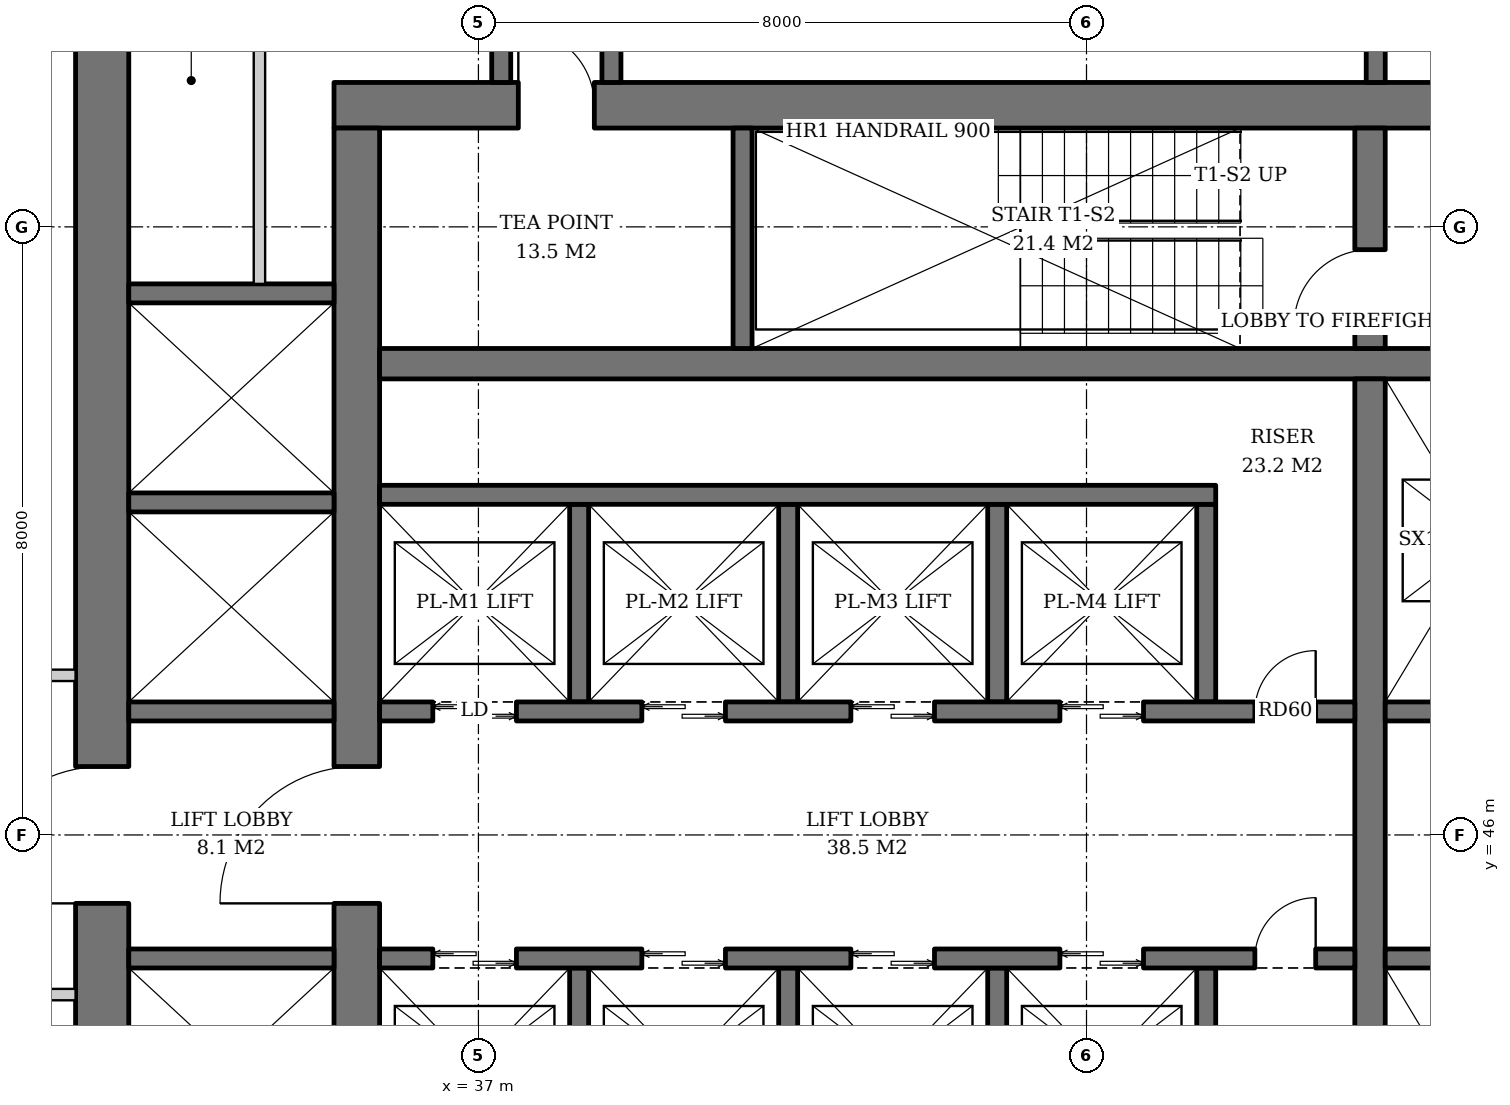
"""IFC4 building model, lengths in metres.
Left out: names, types, materials, properties, quantities, classifications, styles, units other than length and angle.
Written with IfcOpenShell. Run it as: python <this file> out.ifc"""

import sys

from ifc_helpers import new_model, si_unit, direction, frame, frame_2d, origin, place, context, subcontext, project, spatial, rectangle, extrude, element, fill, save


model = new_model("IFC4")
c1 = context("Model", 3, precision=1e-05, world=origin(), true_north=direction((0.0, 1.0)))
c2 = subcontext(c1, "Body", "Model", "MODEL_VIEW")
j1 = project(units=[si_unit("LENGTHUNIT", "METRE"), si_unit("PLANEANGLEUNIT", "RADIAN")], contexts=[c1])
p1 = place(None, origin())
s1 = spatial("IfcSite", under=j1, at=p1, CompositionType="ELEMENT")
p2 = place(p1, origin())
s2 = spatial("IfcBuilding", under=s1, at=p2, CompositionType="ELEMENT")
p3 = place(p2, frame((0.0, 0.0, 97.0)))
s3 = spatial("IfcBuildingStorey", under=s2, at=p3, CompositionType="ELEMENT", Elevation=97.0)
p4 = place(p3, frame((35.1, 55.6, 0.0), z_axis=(0.0, 0.0, 1.0), x_axis=(1.0, 0.0, 0.0)))
e1 = element("IfcWall", 1, at=p4, inside=s3, PredefinedType="SHEAR", context=c2, shape_type="SweptSolid", body=[
    extrude(rectangle(XDim=19.8, YDim=0.6, at=frame_2d((9.9, 0.0))), origin(), (0.0, 0.0, 1.0), 3.8),
])
p5 = place(p4, frame((14.54, 0.0, 0.0)))
e2 = element("IfcOpeningElement", 2, at=p5, cuts=e1, PredefinedType="OPENING", context=c2, shape_type="SweptSolid", body=[
    extrude(rectangle(XDim=1.0, YDim=2.1, at=frame_2d((0.5, 1.05))), frame((0.0, 0.31, 0.0), z_axis=(0.0, -1.0, 0.0), x_axis=(1.0, 0.0, 0.0)), (0.0, 0.0, 1.0), 0.62),
])
p6 = place(p4, frame((2.425, 0.0, 0.0)))
e3 = element("IfcOpeningElement", 3, at=p6, cuts=e1, PredefinedType="OPENING", context=c2, shape_type="SweptSolid", body=[
    extrude(rectangle(XDim=1.0, YDim=2.1, at=frame_2d((0.5, 1.05))), frame((0.0, 0.31, 0.0), z_axis=(0.0, -1.0, 0.0), x_axis=(1.0, 0.0, 0.0)), (0.0, 0.0, 1.0), 0.62),
])
p7 = place(p3, frame((35.4, 36.7, 0.0), z_axis=(0.0, 0.0, 1.0), x_axis=(0.0, 1.0, 0.0)))
e4 = element("IfcWall", 4, at=p7, inside=s3, PredefinedType="SHEAR", context=c2, shape_type="SweptSolid", body=[
    extrude(rectangle(XDim=18.6, YDim=0.6, at=frame_2d((9.3, 0.0))), origin(), (0.0, 0.0, 1.0), 3.8),
])
p8 = place(p7, frame((8.4, 0.0, 0.0)))
e5 = element("IfcOpeningElement", 5, at=p8, cuts=e4, PredefinedType="OPENING", context=c2, shape_type="SweptSolid", body=[
    extrude(rectangle(XDim=1.8, YDim=2.4, at=frame_2d((0.9, 1.2))), frame((0.0, 0.31, 0.0), z_axis=(0.0, -1.0, 0.0), x_axis=(1.0, 0.0, 0.0)), (0.0, 0.0, 1.0), 0.62),
])
p9 = place(p3, frame((32.05, 33.4, 0.0), z_axis=(0.0, 0.0, 1.0), x_axis=(0.0, 1.0, 0.0)))
e6 = element("IfcWall", 6, at=p9, inside=s3, PredefinedType="SHEAR", context=c2, shape_type="SweptSolid", body=[
    extrude(rectangle(XDim=25.2, YDim=0.7, at=frame_2d((12.6, 0.0))), origin(), (0.0, 0.0, 1.0), 3.8),
])
p10 = place(p9, frame((11.7, 0.0, 0.0)))
e7 = element("IfcOpeningElement", 7, at=p10, cuts=e6, PredefinedType="OPENING", context=c2, shape_type="SweptSolid", body=[
    extrude(rectangle(XDim=1.8, YDim=2.4, at=frame_2d((0.9, 1.2))), frame((0.0, 0.36, 0.0), z_axis=(0.0, -1.0, 0.0), x_axis=(1.0, 0.0, 0.0)), (0.0, 0.0, 1.0), 0.72),
])
p11 = place(p3, frame((35.7, 52.2, 0.0), z_axis=(0.0, 0.0, 1.0), x_axis=(1.0, 0.0, 0.0)))
e8 = element("IfcWall", 8, at=p11, inside=s3, PredefinedType="SHEAR", context=c2, shape_type="SweptSolid", body=[
    extrude(rectangle(XDim=18.6, YDim=0.4, at=frame_2d((9.3, 0.0))), origin(), (0.0, 0.0, 1.0), 3.8),
])
p12 = place(p3, frame((48.73, 40.0, 0.0), z_axis=(0.0, 0.0, 1.0), x_axis=(0.0, 1.0, 0.0)))
e9 = element("IfcWall", 9, at=p12, inside=s3, PredefinedType="SHEAR", context=c2, shape_type="SweptSolid", body=[
    extrude(rectangle(XDim=12.0, YDim=0.4, at=frame_2d((6.0, 0.0))), origin(), (0.0, 0.0, 1.0), 3.8),
])
p13 = place(p3, frame((48.73, 52.4, 0.0), z_axis=(0.0, 0.0, 1.0), x_axis=(0.0, 1.0, 0.0)))
e10 = element("IfcWall", 10, at=p13, inside=s3, PredefinedType="SHEAR", context=c2, shape_type="SweptSolid", body=[
    extrude(rectangle(XDim=2.9, YDim=0.4, at=frame_2d((1.45, 0.0))), origin(), (0.0, 0.0, 1.0), 3.8),
])
p14 = place(p13, frame((0.3, 0.0, 0.0)))
e11 = element("IfcOpeningElement", 11, at=p14, cuts=e10, PredefinedType="OPENING", context=c2, shape_type="SweptSolid", body=[
    extrude(rectangle(XDim=1.0, YDim=2.1, at=frame_2d((0.5, 1.05))), frame((0.0, 0.21, 0.0), z_axis=(0.0, -1.0, 0.0), x_axis=(1.0, 0.0, 0.0)), (0.0, 0.0, 1.0), 0.42),
])
p15 = place(p3, frame((40.475, 52.4, 0.0), z_axis=(0.0, 0.0, 1.0), x_axis=(0.0, 1.0, 0.0)))
e12 = element("IfcWall", 12, at=p15, inside=s3, PredefinedType="SHEAR", context=c2, shape_type="SweptSolid", body=[
    extrude(rectangle(XDim=2.9, YDim=0.25, at=frame_2d((1.45, 0.0))), origin(), (0.0, 0.0, 1.0), 3.8),
])
for number, where, z_axis, x_axis in (
    (13, (38.325, 47.75, 0.0), (0.0, 0.0, 1.0), (0.0, 1.0, 0.0)),
    (14, (41.075, 47.75, 0.0), (0.0, 0.0, 1.0), (0.0, 1.0, 0.0)),
    (15, (43.825, 47.75, 0.0), (0.0, 0.0, 1.0), (0.0, 1.0, 0.0)),
    (16, (46.575, 47.75, 0.0), (0.0, 0.0, 1.0), (0.0, 1.0, 0.0)),
):
    element("IfcWall", number, at=place(p3, frame(where, z_axis=z_axis, x_axis=x_axis)), inside=s3, PredefinedType="SHEAR", context=c2, shape_type="SweptSolid", body=[
        extrude(rectangle(XDim=2.6, YDim=0.25, at=frame_2d((1.3, 0.0))), origin(), (0.0, 0.0, 1.0), 3.8),
    ])
p16 = place(p3, frame((35.7, 50.475, 0.0), z_axis=(0.0, 0.0, 1.0), x_axis=(1.0, 0.0, 0.0)))
e17 = element("IfcWall", 17, at=p16, inside=s3, PredefinedType="SHEAR", context=c2, shape_type="SweptSolid", body=[
    extrude(rectangle(XDim=11.0, YDim=0.25, at=frame_2d((5.5, 0.0))), origin(), (0.0, 0.0, 1.0), 3.8),
])
p17 = place(p3, frame((35.7, 47.625, 0.0), z_axis=(0.0, 0.0, 1.0), x_axis=(1.0, 0.0, 0.0)))
e18 = element("IfcWall", 18, at=p17, inside=s3, PredefinedType="SHEAR", context=c2, shape_type="SweptSolid", body=[
    extrude(rectangle(XDim=12.83, YDim=0.25, at=frame_2d((6.415, 0.0))), origin(), (0.0, 0.0, 1.0), 3.8),
])
p18 = place(p17, frame((0.7, 0.0, 0.0)))
e19 = element("IfcOpeningElement", 19, at=p18, cuts=e18, PredefinedType="OPENING", context=c2, shape_type="SweptSolid", body=[
    extrude(rectangle(XDim=1.1, YDim=2.2, at=frame_2d((0.55, 1.1))), frame((0.0, 0.135, 0.0), z_axis=(0.0, -1.0, 0.0), x_axis=(1.0, 0.0, 0.0)), (0.0, 0.0, 1.0), 0.27),
])
p19 = place(p17, frame((3.45, 0.0, 0.0)))
e20 = element("IfcOpeningElement", 20, at=p19, cuts=e18, PredefinedType="OPENING", context=c2, shape_type="SweptSolid", body=[
    extrude(rectangle(XDim=1.1, YDim=2.2, at=frame_2d((0.55, 1.1))), frame((0.0, 0.135, 0.0), z_axis=(0.0, -1.0, 0.0), x_axis=(1.0, 0.0, 0.0)), (0.0, 0.0, 1.0), 0.27),
])
p20 = place(p17, frame((6.2, 0.0, 0.0)))
e21 = element("IfcOpeningElement", 21, at=p20, cuts=e18, PredefinedType="OPENING", context=c2, shape_type="SweptSolid", body=[
    extrude(rectangle(XDim=1.1, YDim=2.2, at=frame_2d((0.55, 1.1))), frame((0.0, 0.135, 0.0), z_axis=(0.0, -1.0, 0.0), x_axis=(1.0, 0.0, 0.0)), (0.0, 0.0, 1.0), 0.27),
])
p21 = place(p17, frame((8.95, 0.0, 0.0)))
e22 = element("IfcOpeningElement", 22, at=p21, cuts=e18, PredefinedType="OPENING", context=c2, shape_type="SweptSolid", body=[
    extrude(rectangle(XDim=1.1, YDim=2.2, at=frame_2d((0.55, 1.1))), frame((0.0, 0.135, 0.0), z_axis=(0.0, -1.0, 0.0), x_axis=(1.0, 0.0, 0.0)), (0.0, 0.0, 1.0), 0.27),
])
p22 = place(p17, frame((11.515, 0.0, 0.0)))
e23 = element("IfcOpeningElement", 23, at=p22, cuts=e18, PredefinedType="OPENING", context=c2, shape_type="SweptSolid", body=[
    extrude(rectangle(XDim=0.8, YDim=2.0, at=frame_2d((0.4, 1.0))), frame((0.0, 0.135, 0.0), z_axis=(0.0, -1.0, 0.0), x_axis=(1.0, 0.0, 0.0)), (0.0, 0.0, 1.0), 0.27),
])
for number, where, z_axis, x_axis in (
    (24, (38.325, 44.25, 0.0), (0.0, 0.0, 1.0), (0.0, -1.0, 0.0)),
    (25, (41.075, 44.25, 0.0), (0.0, 0.0, 1.0), (0.0, -1.0, 0.0)),
    (26, (43.825, 44.25, 0.0), (0.0, 0.0, 1.0), (0.0, -1.0, 0.0)),
    (27, (46.575, 44.25, 0.0), (0.0, 0.0, 1.0), (0.0, -1.0, 0.0)),
):
    element("IfcWall", number, at=place(p3, frame(where, z_axis=z_axis, x_axis=x_axis)), inside=s3, PredefinedType="SHEAR", context=c2, shape_type="SweptSolid", body=[
        extrude(rectangle(XDim=2.6, YDim=0.25, at=frame_2d((1.3, 0.0))), origin(), (0.0, 0.0, 1.0), 3.8),
    ])
p23 = place(p3, frame((35.7, 44.375, 0.0), z_axis=(0.0, 0.0, 1.0), x_axis=(1.0, 0.0, 0.0)))
e28 = element("IfcWall", 28, at=p23, inside=s3, PredefinedType="SHEAR", context=c2, shape_type="SweptSolid", body=[
    extrude(rectangle(XDim=12.83, YDim=0.25, at=frame_2d((6.415, 0.0))), origin(), (0.0, 0.0, 1.0), 3.8),
])
p24 = place(p23, frame((0.7, 0.0, 0.0)))
e29 = element("IfcOpeningElement", 29, at=p24, cuts=e28, PredefinedType="OPENING", context=c2, shape_type="SweptSolid", body=[
    extrude(rectangle(XDim=1.1, YDim=2.2, at=frame_2d((0.55, 1.1))), frame((0.0, 0.135, 0.0), z_axis=(0.0, -1.0, 0.0), x_axis=(1.0, 0.0, 0.0)), (0.0, 0.0, 1.0), 0.27),
])
p25 = place(p23, frame((3.45, 0.0, 0.0)))
e30 = element("IfcOpeningElement", 30, at=p25, cuts=e28, PredefinedType="OPENING", context=c2, shape_type="SweptSolid", body=[
    extrude(rectangle(XDim=1.1, YDim=2.2, at=frame_2d((0.55, 1.1))), frame((0.0, 0.135, 0.0), z_axis=(0.0, -1.0, 0.0), x_axis=(1.0, 0.0, 0.0)), (0.0, 0.0, 1.0), 0.27),
])
p26 = place(p23, frame((6.2, 0.0, 0.0)))
e31 = element("IfcOpeningElement", 31, at=p26, cuts=e28, PredefinedType="OPENING", context=c2, shape_type="SweptSolid", body=[
    extrude(rectangle(XDim=1.1, YDim=2.2, at=frame_2d((0.55, 1.1))), frame((0.0, 0.135, 0.0), z_axis=(0.0, -1.0, 0.0), x_axis=(1.0, 0.0, 0.0)), (0.0, 0.0, 1.0), 0.27),
])
p27 = place(p23, frame((8.95, 0.0, 0.0)))
e32 = element("IfcOpeningElement", 32, at=p27, cuts=e28, PredefinedType="OPENING", context=c2, shape_type="SweptSolid", body=[
    extrude(rectangle(XDim=1.1, YDim=2.2, at=frame_2d((0.55, 1.1))), frame((0.0, 0.135, 0.0), z_axis=(0.0, -1.0, 0.0), x_axis=(1.0, 0.0, 0.0)), (0.0, 0.0, 1.0), 0.27),
])
p28 = place(p23, frame((11.515, 0.0, 0.0)))
e33 = element("IfcOpeningElement", 33, at=p28, cuts=e28, PredefinedType="OPENING", context=c2, shape_type="SweptSolid", body=[
    extrude(rectangle(XDim=0.8, YDim=2.0, at=frame_2d((0.4, 1.0))), frame((0.0, 0.135, 0.0), z_axis=(0.0, -1.0, 0.0), x_axis=(1.0, 0.0, 0.0)), (0.0, 0.0, 1.0), 0.27),
])
for number, where, z_axis, x_axis in (
    (34, (48.93, 47.625, 0.0), (0.0, 0.0, 1.0), (1.0, 0.0, 0.0)),
    (35, (48.93, 44.375, 0.0), (0.0, 0.0, 1.0), (1.0, 0.0, 0.0)),
):
    element("IfcWall", number, at=place(p3, frame(where, z_axis=z_axis, x_axis=x_axis)), inside=s3, PredefinedType="SHEAR", context=c2, shape_type="SweptSolid", body=[
        extrude(rectangle(XDim=5.37, YDim=0.25, at=frame_2d((2.685, 0.0))), origin(), (0.0, 0.0, 1.0), 3.8),
    ])
for number, where, z_axis, x_axis in (
    (36, (32.4, 44.375, 0.0), (0.0, 0.0, 1.0), (1.0, 0.0, 0.0)),
    (37, (32.4, 47.625, 0.0), (0.0, 0.0, 1.0), (1.0, 0.0, 0.0)),
    (38, (32.4, 50.375, 0.0), (0.0, 0.0, 1.0), (1.0, 0.0, 0.0)),
    (39, (32.4, 53.125, 0.0), (0.0, 0.0, 1.0), (1.0, 0.0, 0.0)),
):
    element("IfcWall", number, at=place(p3, frame(where, z_axis=z_axis, x_axis=x_axis)), inside=s3, PredefinedType="SHEAR", context=c2, shape_type="SweptSolid", body=[
        extrude(rectangle(XDim=2.7, YDim=0.25, at=frame_2d((1.35, 0.0))), origin(), (0.0, 0.0, 1.0), 3.8),
    ])
for number, where, z_axis, x_axis in (
    (40, (48.805, 55.9, 0.0), (0.0, 0.0, 1.0), (0.0, 1.0, 0.0)),
    (41, (37.3, 55.9, 0.0), (0.0, 0.0, 1.0), (0.0, 1.0, 0.0)),
    (42, (38.75, 55.9, 0.0), (0.0, 0.0, 1.0), (0.0, 1.0, 0.0)),
):
    element("IfcWall", number, at=place(p3, frame(where, z_axis=z_axis, x_axis=x_axis)), inside=s3, PredefinedType="SOLIDWALL", context=c2, shape_type="SweptSolid", body=[
        extrude(rectangle(XDim=2.7, YDim=0.25, at=frame_2d((1.35, 0.0))), origin(), (0.0, 0.0, 1.0), 3.62),
    ])
p29 = place(p3, frame((34.119, 53.25, 0.0), z_axis=(0.0, 0.0, 1.0), x_axis=(0.0, 1.0, 0.0)))
e43 = element("IfcWall", 43, at=p29, inside=s3, PredefinedType="SOLIDWALL", context=c2, shape_type="SweptSolid", body=[
    extrude(rectangle(XDim=5.35, YDim=0.15, at=frame_2d((2.675, 0.0))), origin(), (0.0, 0.0, 1.0), 3.62),
])
for number, where, z_axis, x_axis in (
    (44, (31.7, 48.1, 0.0), (0.0, 0.0, 1.0), (-1.0, 0.0, 0.0)),
    (45, (31.7, 43.9, 0.0), (0.0, 0.0, 1.0), (-1.0, 0.0, 0.0)),
):
    element("IfcWall", number, at=place(p3, frame(where, z_axis=z_axis, x_axis=x_axis)), inside=s3, PredefinedType="PARTITIONING", context=c2, shape_type="SweptSolid", body=[
        extrude(rectangle(XDim=2.325, YDim=0.15, at=frame_2d((1.163, 0.0))), origin(), (0.0, 0.0, 1.0), 3.62),
    ])
p30 = place(p18, origin())
e46 = element("IfcDoor", 46, at=p30, inside=s3, OperationType="DOUBLE_DOOR_SLIDING", PredefinedType="DOOR", context=c2, shape_type="SweptSolid", body=[
    extrude(rectangle(XDim=1.1, YDim=2.2, at=frame_2d((0.55, 1.1))), frame((0.0, 0.025, 0.0), z_axis=(0.0, -1.0, 0.0), x_axis=(1.0, 0.0, 0.0)), (0.0, 0.0, 1.0), 0.05),
])
fill(e19, e46)
p31 = place(p19, origin())
e47 = element("IfcDoor", 47, at=p31, inside=s3, OperationType="DOUBLE_DOOR_SLIDING", PredefinedType="DOOR", context=c2, shape_type="SweptSolid", body=[
    extrude(rectangle(XDim=1.1, YDim=2.2, at=frame_2d((0.55, 1.1))), frame((0.0, 0.025, 0.0), z_axis=(0.0, -1.0, 0.0), x_axis=(1.0, 0.0, 0.0)), (0.0, 0.0, 1.0), 0.05),
])
fill(e20, e47)
p32 = place(p20, origin())
e48 = element("IfcDoor", 48, at=p32, inside=s3, OperationType="DOUBLE_DOOR_SLIDING", PredefinedType="DOOR", context=c2, shape_type="SweptSolid", body=[
    extrude(rectangle(XDim=1.1, YDim=2.2, at=frame_2d((0.55, 1.1))), frame((0.0, 0.025, 0.0), z_axis=(0.0, -1.0, 0.0), x_axis=(1.0, 0.0, 0.0)), (0.0, 0.0, 1.0), 0.05),
])
fill(e21, e48)
p33 = place(p21, origin())
e49 = element("IfcDoor", 49, at=p33, inside=s3, OperationType="DOUBLE_DOOR_SLIDING", PredefinedType="DOOR", context=c2, shape_type="SweptSolid", body=[
    extrude(rectangle(XDim=1.1, YDim=2.2, at=frame_2d((0.55, 1.1))), frame((0.0, 0.025, 0.0), z_axis=(0.0, -1.0, 0.0), x_axis=(1.0, 0.0, 0.0)), (0.0, 0.0, 1.0), 0.05),
])
fill(e22, e49)
p34 = place(p22, origin())
e50 = element("IfcDoor", 50, at=p34, inside=s3, OperationType="SINGLE_SWING_RIGHT", PredefinedType="DOOR", context=c2, shape_type="SweptSolid", body=[
    extrude(rectangle(XDim=0.8, YDim=2.0, at=frame_2d((0.4, 1.0))), frame((0.0, 0.025, 0.0), z_axis=(0.0, -1.0, 0.0), x_axis=(1.0, 0.0, 0.0)), (0.0, 0.0, 1.0), 0.05),
])
fill(e23, e50)
p35 = place(p24, origin())
e51 = element("IfcDoor", 51, at=p35, inside=s3, OperationType="DOUBLE_DOOR_SLIDING", PredefinedType="DOOR", context=c2, shape_type="SweptSolid", body=[
    extrude(rectangle(XDim=1.1, YDim=2.2, at=frame_2d((0.55, 1.1))), frame((0.0, 0.025, 0.0), z_axis=(0.0, -1.0, 0.0), x_axis=(1.0, 0.0, 0.0)), (0.0, 0.0, 1.0), 0.05),
])
fill(e29, e51)
p36 = place(p25, origin())
e52 = element("IfcDoor", 52, at=p36, inside=s3, OperationType="DOUBLE_DOOR_SLIDING", PredefinedType="DOOR", context=c2, shape_type="SweptSolid", body=[
    extrude(rectangle(XDim=1.1, YDim=2.2, at=frame_2d((0.55, 1.1))), frame((0.0, 0.025, 0.0), z_axis=(0.0, -1.0, 0.0), x_axis=(1.0, 0.0, 0.0)), (0.0, 0.0, 1.0), 0.05),
])
fill(e30, e52)
p37 = place(p26, origin())
e53 = element("IfcDoor", 53, at=p37, inside=s3, OperationType="DOUBLE_DOOR_SLIDING", PredefinedType="DOOR", context=c2, shape_type="SweptSolid", body=[
    extrude(rectangle(XDim=1.1, YDim=2.2, at=frame_2d((0.55, 1.1))), frame((0.0, 0.025, 0.0), z_axis=(0.0, -1.0, 0.0), x_axis=(1.0, 0.0, 0.0)), (0.0, 0.0, 1.0), 0.05),
])
fill(e31, e53)
p38 = place(p27, origin())
e54 = element("IfcDoor", 54, at=p38, inside=s3, OperationType="DOUBLE_DOOR_SLIDING", PredefinedType="DOOR", context=c2, shape_type="SweptSolid", body=[
    extrude(rectangle(XDim=1.1, YDim=2.2, at=frame_2d((0.55, 1.1))), frame((0.0, 0.025, 0.0), z_axis=(0.0, -1.0, 0.0), x_axis=(1.0, 0.0, 0.0)), (0.0, 0.0, 1.0), 0.05),
])
fill(e32, e54)
p39 = place(p28, origin())
e55 = element("IfcDoor", 55, at=p39, inside=s3, OperationType="SINGLE_SWING_RIGHT", PredefinedType="DOOR", context=c2, shape_type="SweptSolid", body=[
    extrude(rectangle(XDim=0.8, YDim=2.0, at=frame_2d((0.4, 1.0))), frame((0.0, 0.025, 0.0), z_axis=(0.0, -1.0, 0.0), x_axis=(1.0, 0.0, 0.0)), (0.0, 0.0, 1.0), 0.05),
])
fill(e33, e55)
p40 = place(p14, origin())
e56 = element("IfcDoor", 56, at=p40, inside=s3, OperationType="SINGLE_SWING_LEFT", PredefinedType="DOOR", context=c2, shape_type="SweptSolid", body=[
    extrude(rectangle(XDim=1.0, YDim=2.1, at=frame_2d((0.5, 1.05))), frame((0.0, 0.025, 0.0), z_axis=(0.0, -1.0, 0.0), x_axis=(1.0, 0.0, 0.0)), (0.0, 0.0, 1.0), 0.05),
])
fill(e11, e56)
p41 = place(p8, origin())
e57 = element("IfcDoor", 57, at=p41, inside=s3, OperationType="DOUBLE_DOOR_SINGLE_SWING", PredefinedType="DOOR", context=c2, shape_type="SweptSolid", body=[
    extrude(rectangle(XDim=1.8, YDim=2.4, at=frame_2d((0.9, 1.2))), frame((0.0, 0.025, 0.0), z_axis=(0.0, -1.0, 0.0), x_axis=(1.0, 0.0, 0.0)), (0.0, 0.0, 1.0), 0.05),
])
fill(e5, e57)
p42 = place(p10, origin())
e58 = element("IfcDoor", 58, at=p42, inside=s3, OperationType="DOUBLE_DOOR_SINGLE_SWING", PredefinedType="DOOR", context=c2, shape_type="SweptSolid", body=[
    extrude(rectangle(XDim=1.8, YDim=2.4, at=frame_2d((0.9, 1.2))), frame((0.0, 0.025, 0.0), z_axis=(0.0, -1.0, 0.0), x_axis=(1.0, 0.0, 0.0)), (0.0, 0.0, 1.0), 0.05),
])
fill(e7, e58)
p43 = place(p6, origin())
e59 = element("IfcDoor", 59, at=p43, inside=s3, OperationType="SINGLE_SWING_LEFT", PredefinedType="DOOR", context=c2, shape_type="SweptSolid", body=[
    extrude(rectangle(XDim=1.0, YDim=2.1, at=frame_2d((0.5, 1.05))), frame((0.0, -0.24, 0.0), z_axis=(0.0, -1.0, 0.0), x_axis=(1.0, 0.0, 0.0)), (0.0, 0.0, 1.0), 0.05),
])
fill(e3, e59)
save(model, sys.argv[1])
